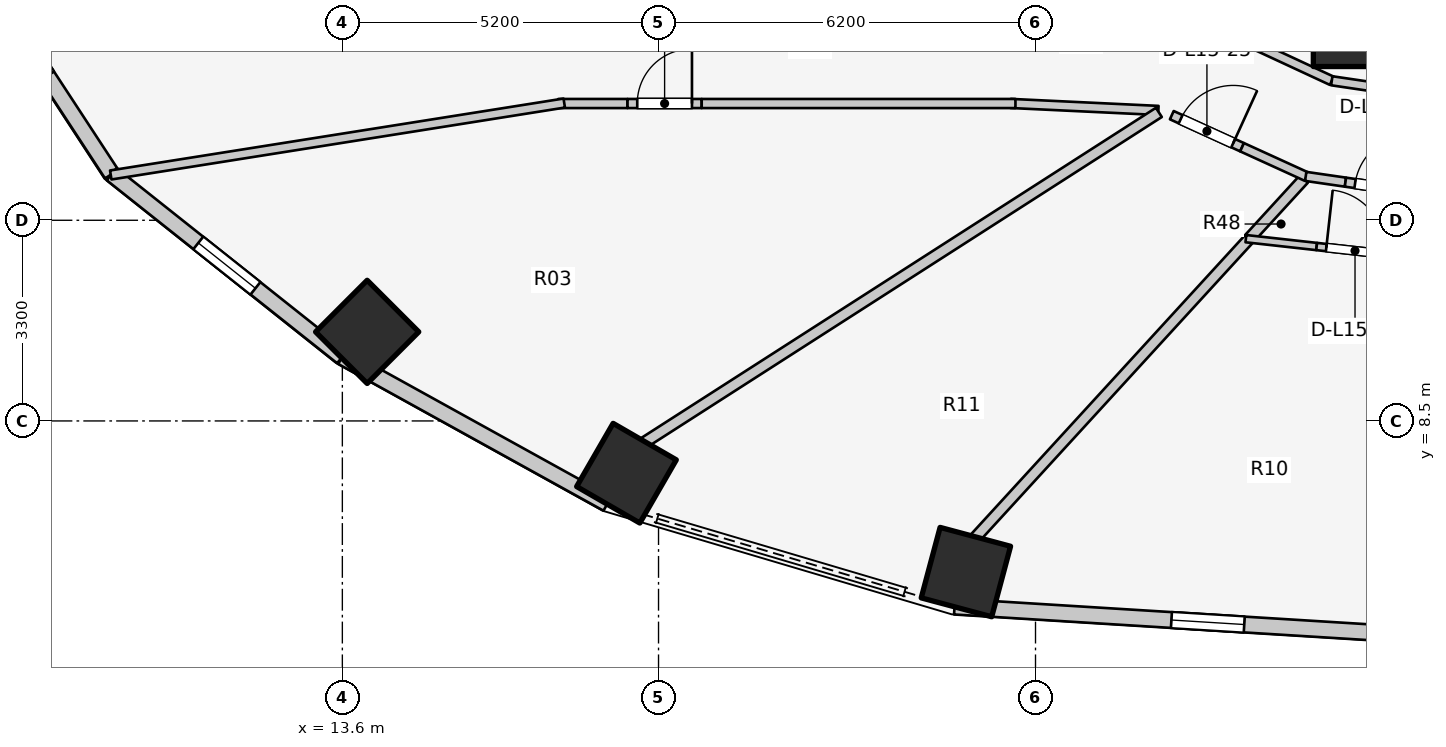
"""IFC4 building model, lengths in metres.
Left out: names, types, materials, properties, quantities, classifications, styles, units other than length and angle.
Written with IfcOpenShell. Run it as: python <this file> out.ifc"""

import sys

from ifc_helpers import new_model, si_unit, direction, frame, frame_2d, origin, origin_2d, place, context, subcontext, project, spatial, rectangle, extrude, element, fill, save


model = new_model("IFC4")
c1 = context("Model", 3, precision=1e-05, world=origin(), true_north=direction((0.0, 1.0)))
c2 = subcontext(c1, "Body", "Model", "MODEL_VIEW")
j1 = project(units=[si_unit("LENGTHUNIT", "METRE"), si_unit("PLANEANGLEUNIT", "RADIAN")], contexts=[c1])
p1 = place(None, origin())
s1 = spatial("IfcSite", under=j1, at=p1, CompositionType="ELEMENT")
p2 = place(p1, origin())
s2 = spatial("IfcBuilding", under=s1, at=p2, CompositionType="ELEMENT")
p3 = place(p2, frame((0.0, 0.0, 52.4)))
s3 = spatial("IfcBuildingStorey", under=s2, at=p3, CompositionType="ELEMENT", Elevation=52.4)
for number, where, z_axis, x_axis in (
    (1, (14.008, 9.965, 0.0), (0.0, 0.0, 1.0), (-0.707, -0.707, 0.0)),
    (2, (18.273, 7.641, 0.0), (0.0, 0.0, 1.0), (-0.5, -0.866, 0.0)),
):
    element("IfcColumn", number, at=place(p3, frame(where, z_axis=z_axis, x_axis=x_axis)), inside=s3, PredefinedType="COLUMN", context=c2, shape_type="SweptSolid", body=[
        extrude(rectangle(XDim=1.2, YDim=1.2, at=origin_2d()), origin(), (0.0, 0.0, 1.0), 3.1),
    ])
p4 = place(p3, frame((30.069, 14.828, 0.0), z_axis=(0.0, 0.0, 1.0), x_axis=(1.0, 0.0, 0.0)))
e3 = element("IfcColumn", 3, at=p4, inside=s3, PredefinedType="COLUMN", context=c2, shape_type="SweptSolid", body=[
    extrude(rectangle(XDim=1.0, YDim=1.0, at=origin_2d()), origin(), (0.0, 0.0, 1.0), 3.1),
])
p5 = place(p3, frame((23.855, 6.014, 0.0), z_axis=(0.0, 0.0, 1.0), x_axis=(-0.258819045103, -0.965925826289, 0.0)))
e4 = element("IfcColumn", 4, at=p5, inside=s3, PredefinedType="COLUMN", context=c2, shape_type="SweptSolid", body=[
    extrude(rectangle(XDim=1.2, YDim=1.2, at=origin_2d()), origin(), (0.0, 0.0, 1.0), 3.1),
])
p6 = place(p3, frame((7.033, 16.795, 0.0), z_axis=(0.0, 0.0, 1.0), x_axis=(0.547702757047, -0.836672988642, 0.0)))
e5 = element("IfcWall", 5, at=p6, inside=s3, PredefinedType="STANDARD", context=c2, shape_type="SweptSolid", body=[
    extrude(rectangle(XDim=5.062, YDim=0.26, at=frame_2d((2.531, 0.0))), origin(), (0.0, 0.0, 1.0), 1.22),
])
p7 = place(p6, frame((1.931, 0.0, 0.15)))
e6 = element("IfcOpeningElement", 6, at=p7, cuts=e5, PredefinedType="OPENING", context=c2, shape_type="SweptSolid", body=[
    extrude(rectangle(XDim=1.2, YDim=0.9, at=frame_2d((0.6, 0.45))), frame((0.0, 0.14, 0.0), z_axis=(0.0, -1.0, 0.0), x_axis=(1.0, 0.0, 0.0)), (0.0, 0.0, 1.0), 0.28),
])
p8 = place(p3, frame((9.806, 12.559, 0.0), z_axis=(0.0, 0.0, 1.0), x_axis=(0.783123133379, -0.621866672179, 0.0)))
e7 = element("IfcWall", 7, at=p8, inside=s3, PredefinedType="STANDARD", context=c2, shape_type="SweptSolid", body=[
    extrude(rectangle(XDim=4.839, YDim=0.26, at=frame_2d((2.419, 0.0))), origin(), (0.0, 0.0, 1.0), 1.22),
])
p9 = place(p8, frame((1.819, 0.0, 0.15)))
e8 = element("IfcOpeningElement", 8, at=p9, cuts=e7, PredefinedType="OPENING", context=c2, shape_type="SweptSolid", body=[
    extrude(rectangle(XDim=1.2, YDim=0.9, at=frame_2d((0.6, 0.45))), frame((0.0, 0.14, 0.0), z_axis=(0.0, -1.0, 0.0), x_axis=(1.0, 0.0, 0.0)), (0.0, 0.0, 1.0), 0.28),
])
p10 = place(p3, frame((13.595, 9.55, 0.0), z_axis=(0.0, 0.0, 1.0), x_axis=(0.875137303239, -0.483874674352, 0.0)))
e9 = element("IfcWall", 9, at=p10, inside=s3, PredefinedType="STANDARD", context=c2, shape_type="SweptSolid", body=[
    extrude(rectangle(XDim=4.985, YDim=0.26, at=frame_2d((2.493, 0.0))), origin(), (0.0, 0.0, 1.0), 1.22),
])
p11 = place(p3, frame((23.668, 5.447, 0.0), z_axis=(0.0, 0.0, 1.0), x_axis=(0.998090514779, -0.061768311519, 0.0)))
e10 = element("IfcWall", 10, at=p11, inside=s3, PredefinedType="STANDARD", context=c2, shape_type="SweptSolid", body=[
    extrude(rectangle(XDim=8.348, YDim=0.26, at=frame_2d((4.174, 0.0))), origin(), (0.0, 0.0, 1.0), 1.22),
])
p12 = place(p11, frame((3.574, 0.0, 0.15)))
e11 = element("IfcOpeningElement", 11, at=p12, cuts=e10, PredefinedType="OPENING", context=c2, shape_type="SweptSolid", body=[
    extrude(rectangle(XDim=1.2, YDim=0.9, at=frame_2d((0.6, 0.45))), frame((0.0, 0.14, 0.0), z_axis=(0.0, -1.0, 0.0), x_axis=(1.0, 0.0, 0.0)), (0.0, 0.0, 1.0), 0.28),
])
p13 = place(p3, frame((27.89, 15.015, 0.0), z_axis=(0.0, 0.0, 1.0), x_axis=(0.906943449489, -0.421252393975, 0.0)))
e12 = element("IfcWall", 12, at=p13, inside=s3, PredefinedType="PARTITIONING", context=c2, shape_type="SweptSolid", body=[
    extrude(rectangle(XDim=2.186, YDim=0.15, at=frame_2d((1.093, 0.0))), origin(), (0.0, 0.0, 1.0), 1.22),
])
p14 = place(p3, frame((29.873, 14.094, 0.0), z_axis=(0.0, 0.0, 1.0), x_axis=(0.989268584896, -0.146108408166, 0.0)))
e13 = element("IfcWall", 13, at=p14, inside=s3, PredefinedType="PARTITIONING", context=c2, shape_type="SweptSolid", body=[
    extrude(rectangle(XDim=2.151, YDim=0.15, at=frame_2d((1.075, 0.0))), origin(), (0.0, 0.0, 1.0), 1.22),
])
p15 = place(p3, frame((27.02, 13.606, 0.0), z_axis=(0.0, 0.0, 1.0), x_axis=(-0.998877427952, 0.047369651964, 0.0)))
e14 = element("IfcWall", 14, at=p15, inside=s3, PredefinedType="PARTITIONING", context=c2, shape_type="SweptSolid", body=[
    extrude(rectangle(XDim=2.433, YDim=0.15, at=frame_2d((1.216, 0.0))), origin(), (0.0, 0.0, 1.0), 1.22),
])
p16 = place(p3, frame((17.15, 13.72, 0.0), z_axis=(0.0, 0.0, 1.0), x_axis=(1.0, 0.0, 0.0)))
e15 = element("IfcWall", 15, at=p16, inside=s3, PredefinedType="PARTITIONING", context=c2, shape_type="SweptSolid", body=[
    extrude(rectangle(XDim=1.14, YDim=0.15, at=frame_2d((0.57, 0.0))), origin(), (0.0, 0.0, 1.0), 2.575),
])
p17 = place(p3, frame((18.29, 13.72, 0.0), z_axis=(0.0, 0.0, 1.0), x_axis=(1.0, 0.0, 0.0)))
e16 = element("IfcWall", 16, at=p17, inside=s3, PredefinedType="PARTITIONING", context=c2, shape_type="SweptSolid", body=[
    extrude(rectangle(XDim=1.22, YDim=0.15, at=frame_2d((0.61, 0.0))), origin(), (0.0, 0.0, 1.0), 2.575),
])
p18 = place(p17, frame((0.16, 0.0, 0.0)))
e17 = element("IfcOpeningElement", 17, at=p18, cuts=e16, PredefinedType="OPENING", context=c2, shape_type="SweptSolid", body=[
    extrude(rectangle(XDim=0.9, YDim=2.1, at=frame_2d((0.45, 1.05))), frame((0.0, 0.085, 0.0), z_axis=(0.0, -1.0, 0.0), x_axis=(1.0, 0.0, 0.0)), (0.0, 0.0, 1.0), 0.17),
])
p19 = place(p3, frame((19.51, 13.72, 0.0), z_axis=(0.0, 0.0, 1.0), x_axis=(1.0, 0.0, 0.0)))
e18 = element("IfcWall", 18, at=p19, inside=s3, PredefinedType="PARTITIONING", context=c2, shape_type="SweptSolid", body=[
    extrude(rectangle(XDim=5.16, YDim=0.15, at=frame_2d((2.58, 0.0))), origin(), (0.0, 0.0, 1.0), 1.22),
])
p20 = place(p3, frame((17.25, 13.728, 0.0), z_axis=(0.0, 0.0, 1.0), x_axis=(-0.987655781226, -0.156639898525, 0.0)))
e19 = element("IfcWall", 19, at=p20, inside=s3, PredefinedType="PARTITIONING", context=c2, shape_type="SweptSolid", body=[
    extrude(rectangle(XDim=7.552, YDim=0.15, at=frame_2d((3.776, 0.0))), origin(), (0.0, 0.0, 1.0), 1.22),
])
p21 = place(p3, frame((27.029, 13.574, 0.0), z_axis=(0.0, 0.0, 1.0), x_axis=(-0.841689919529, -0.5399611832, 0.0)))
e20 = element("IfcWall", 20, at=p21, inside=s3, PredefinedType="PARTITIONING", context=c2, shape_type="SweptSolid", body=[
    extrude(rectangle(XDim=10.058, YDim=0.18, at=frame_2d((5.029, 0.0))), origin(), (0.0, 0.0, 1.0), 1.22),
])
p22 = place(p3, frame((29.414, 12.479, 0.0), z_axis=(0.0, 0.0, 1.0), x_axis=(-0.675465011224, -0.737392038615, 0.0)))
e21 = element("IfcWall", 21, at=p22, inside=s3, PredefinedType="PARTITIONING", context=c2, shape_type="SweptSolid", body=[
    extrude(rectangle(XDim=8.007, YDim=0.18, at=frame_2d((4.003, 0.0))), origin(), (0.0, 0.0, 1.0), 1.22),
])
p23 = place(p3, frame((27.241, 13.529, 0.0), z_axis=(0.0, 0.0, 1.0), x_axis=(0.909740090182, -0.415178236804, 0.0)))
e22 = element("IfcWall", 22, at=p23, inside=s3, PredefinedType="PARTITIONING", context=c2, shape_type="SweptSolid", body=[
    extrude(rectangle(XDim=1.27, YDim=0.15, at=frame_2d((0.635, 0.0))), origin(), (0.0, 0.0, 1.0), 2.16),
])
p24 = place(p23, frame((0.16, 0.0, 0.0)))
e23 = element("IfcOpeningElement", 23, at=p24, cuts=e22, PredefinedType="OPENING", context=c2, shape_type="SweptSolid", body=[
    extrude(rectangle(XDim=0.95, YDim=2.1, at=frame_2d((0.475, 1.05))), frame((0.0, 0.085, 0.0), z_axis=(0.0, -1.0, 0.0), x_axis=(1.0, 0.0, 0.0)), (0.0, 0.0, 1.0), 0.17),
])
p25 = place(p3, frame((28.397, 13.001, 0.0), z_axis=(0.0, 0.0, 1.0), x_axis=(0.909741327194, -0.415175526249, 0.0)))
e24 = element("IfcWall", 24, at=p25, inside=s3, PredefinedType="PARTITIONING", context=c2, shape_type="SweptSolid", body=[
    extrude(rectangle(XDim=1.166, YDim=0.15, at=frame_2d((0.583, 0.0))), origin(), (0.0, 0.0, 1.0), 1.22),
])
p26 = place(p3, frame((28.46, 11.498, 0.0), z_axis=(0.0, 0.0, 1.0), x_axis=(0.993876104587, -0.110500175253, 0.0)))
e25 = element("IfcWall", 25, at=p26, inside=s3, PredefinedType="MOVABLE", context=c2, shape_type="SweptSolid", body=[
    extrude(rectangle(XDim=1.171, YDim=0.12, at=frame_2d((0.585, 0.0))), origin(), (0.0, 0.0, 1.0), 2.575),
])
p27 = place(p3, frame((29.624, 11.368, 0.0), z_axis=(0.0, 0.0, 1.0), x_axis=(0.993895448934, -0.110326046739, 0.0)))
e26 = element("IfcWall", 26, at=p27, inside=s3, PredefinedType="MOVABLE", context=c2, shape_type="SweptSolid", body=[
    extrude(rectangle(XDim=1.27, YDim=0.12, at=frame_2d((0.635, 0.0))), origin(), (0.0, 0.0, 1.0), 2.575),
])
p28 = place(p27, frame((0.16, 0.0, 0.0)))
e27 = element("IfcOpeningElement", 27, at=p28, cuts=e26, PredefinedType="OPENING", context=c2, shape_type="SweptSolid", body=[
    extrude(rectangle(XDim=0.95, YDim=2.1, at=frame_2d((0.475, 1.05))), frame((0.0, 0.07, 0.0), z_axis=(0.0, -1.0, 0.0), x_axis=(1.0, 0.0, 0.0)), (0.0, 0.0, 1.0), 0.14),
])
p29 = place(p3, frame((29.444, 12.522, 0.0), z_axis=(0.0, 0.0, 1.0), x_axis=(0.989643848527, -0.143544603076, 0.0)))
e28 = element("IfcWall", 28, at=p29, inside=s3, PredefinedType="PARTITIONING", context=c2, shape_type="SweptSolid", body=[
    extrude(rectangle(XDim=0.66, YDim=0.15, at=frame_2d((0.33, 0.0))), origin(), (0.0, 0.0, 1.0), 2.575),
])
p30 = place(p3, frame((30.097, 12.427, 0.0), z_axis=(0.0, 0.0, 1.0), x_axis=(0.989635669595, -0.143600980029, 0.0)))
e29 = element("IfcWall", 29, at=p30, inside=s3, PredefinedType="PARTITIONING", context=c2, shape_type="SweptSolid", body=[
    extrude(rectangle(XDim=1.27, YDim=0.15, at=frame_2d((0.635, 0.0))), origin(), (0.0, 0.0, 1.0), 2.575),
])
p31 = place(p30, frame((0.16, 0.0, 0.0)))
e30 = element("IfcOpeningElement", 30, at=p31, cuts=e29, PredefinedType="OPENING", context=c2, shape_type="SweptSolid", body=[
    extrude(rectangle(XDim=0.95, YDim=2.1, at=frame_2d((0.475, 1.05))), frame((0.0, 0.085, 0.0), z_axis=(0.0, -1.0, 0.0), x_axis=(1.0, 0.0, 0.0)), (0.0, 0.0, 1.0), 0.17),
])
p32 = place(p9, origin())
e31 = element("IfcWindow", 31, at=p32, inside=s3, PartitioningType="SINGLE_PANEL", PredefinedType="WINDOW", context=c2, shape_type="SweptSolid", body=[
    extrude(rectangle(XDim=1.2, YDim=0.9, at=frame_2d((0.6, 0.45))), frame((0.0, 0.03, 0.0), z_axis=(0.0, -1.0, 0.0), x_axis=(1.0, 0.0, 0.0)), (0.0, 0.0, 1.0), 0.06),
])
fill(e8, e31)
p33 = place(p12, origin())
e32 = element("IfcWindow", 32, at=p33, inside=s3, PartitioningType="SINGLE_PANEL", PredefinedType="WINDOW", context=c2, shape_type="SweptSolid", body=[
    extrude(rectangle(XDim=1.2, YDim=0.9, at=frame_2d((0.6, 0.45))), frame((0.0, 0.03, 0.0), z_axis=(0.0, -1.0, 0.0), x_axis=(1.0, 0.0, 0.0)), (0.0, 0.0, 1.0), 0.06),
])
fill(e11, e32)
p34 = place(p18, origin())
e33 = element("IfcDoor", 33, at=p34, inside=s3, OperationType="SINGLE_SWING_RIGHT", PredefinedType="DOOR", context=c2, shape_type="SweptSolid", body=[
    extrude(rectangle(XDim=0.9, YDim=2.1, at=frame_2d((0.45, 1.05))), frame((0.0, 0.025, 0.0), z_axis=(0.0, -1.0, 0.0), x_axis=(1.0, 0.0, 0.0)), (0.0, 0.0, 1.0), 0.05),
])
fill(e17, e33)
p35 = place(p24, origin())
e34 = element("IfcDoor", 34, at=p35, inside=s3, OperationType="SINGLE_SWING_RIGHT", PredefinedType="DOOR", context=c2, shape_type="SweptSolid", body=[
    extrude(rectangle(XDim=0.95, YDim=2.1, at=frame_2d((0.475, 1.05))), frame((0.0, 0.025, 0.0), z_axis=(0.0, -1.0, 0.0), x_axis=(1.0, 0.0, 0.0)), (0.0, 0.0, 1.0), 0.05),
])
fill(e23, e34)
p36 = place(p28, origin())
e35 = element("IfcDoor", 35, at=p36, inside=s3, OperationType="SINGLE_SWING_LEFT", PredefinedType="DOOR", context=c2, shape_type="SweptSolid", body=[
    extrude(rectangle(XDim=0.95, YDim=2.1, at=frame_2d((0.475, 1.05))), frame((0.0, 0.025, 0.0), z_axis=(0.0, -1.0, 0.0), x_axis=(1.0, 0.0, 0.0)), (0.0, 0.0, 1.0), 0.05),
])
fill(e27, e35)
p37 = place(p31, origin())
e36 = element("IfcDoor", 36, at=p37, inside=s3, OperationType="SINGLE_SWING_RIGHT", PredefinedType="DOOR", context=c2, shape_type="SweptSolid", body=[
    extrude(rectangle(XDim=0.95, YDim=2.1, at=frame_2d((0.475, 1.05))), frame((0.0, 0.025, 0.0), z_axis=(0.0, -1.0, 0.0), x_axis=(1.0, 0.0, 0.0)), (0.0, 0.0, 1.0), 0.05),
])
fill(e30, e36)
save(model, sys.argv[1])
